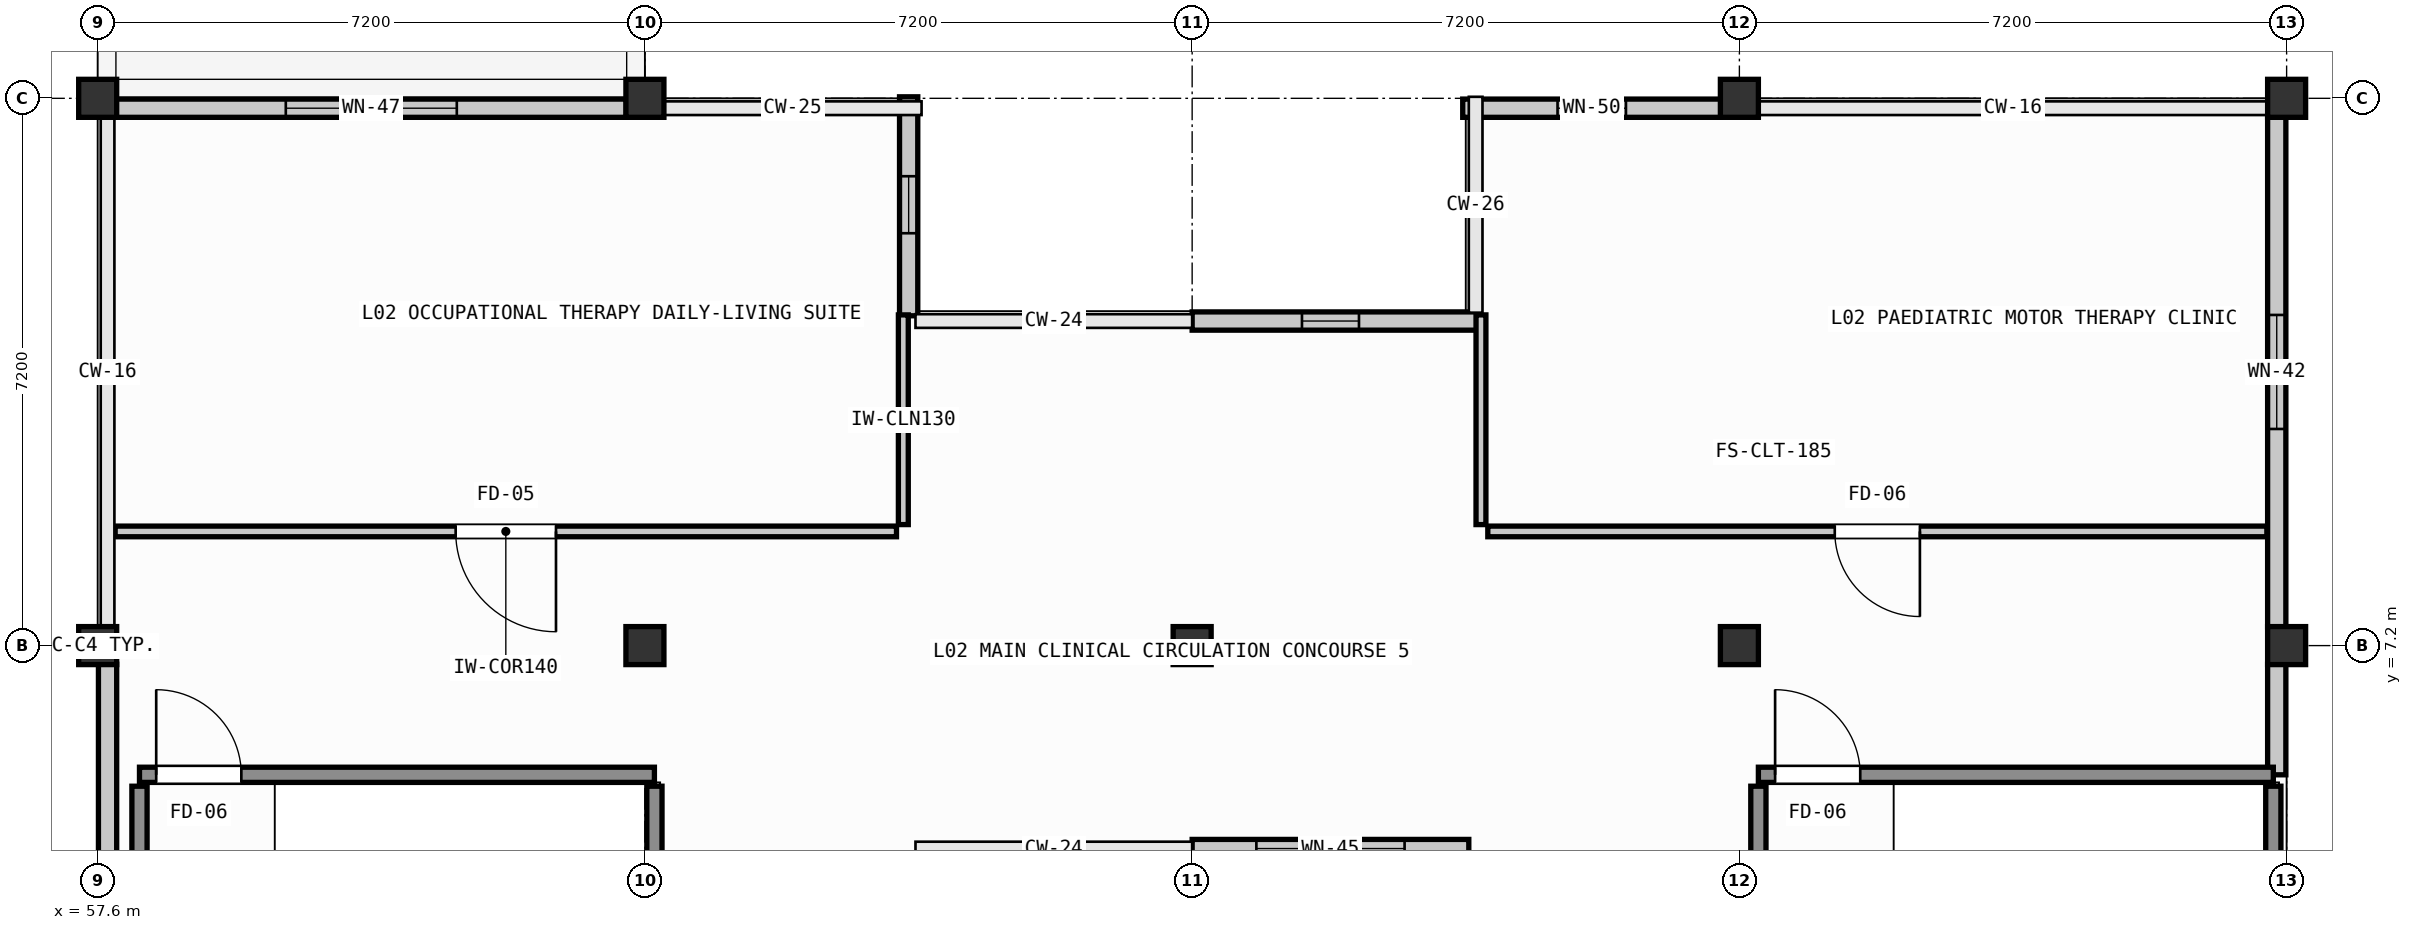
"""IFC4 building model, lengths in metres.
Left out: names, types, materials, properties, quantities, classifications, styles, units other than length and angle.
Written with IfcOpenShell. Run it as: python <this file> out.ifc"""

import sys

from ifc_helpers import new_model, si_unit, direction, frame, frame_2d, origin, origin_2d, place, context, subcontext, project, spatial, rectangle, extrude, element, fill, save


model = new_model("IFC4")
c1 = context("Model", 3, precision=1e-05, world=origin(), true_north=direction((0.0, 1.0)))
c2 = subcontext(c1, "Body", "Model", "MODEL_VIEW")
j1 = project(units=[si_unit("LENGTHUNIT", "METRE"), si_unit("PLANEANGLEUNIT", "RADIAN")], contexts=[c1])
p1 = place(None, origin())
s1 = spatial("IfcSite", under=j1, at=p1, CompositionType="ELEMENT")
p2 = place(p1, origin())
s2 = spatial("IfcBuilding", under=s1, at=p2, CompositionType="ELEMENT")
p3 = place(p2, frame((0.0, 0.0, 4.8)))
s3 = spatial("IfcBuildingStorey", under=s2, at=p3, CompositionType="ELEMENT", Elevation=4.8)
for number, where, z_axis, x_axis in (
    (1, (57.6, 7.2, 0.0), (0.0, 0.0, 1.0), (1.0, 0.0, 0.0)),
    (2, (57.6, 14.4, 0.0), (0.0, 0.0, 1.0), (1.0, 0.0, 0.0)),
    (3, (64.8, 7.2, 0.0), (0.0, 0.0, 1.0), (1.0, 0.0, 0.0)),
    (4, (64.8, 14.4, 0.0), (0.0, 0.0, 1.0), (1.0, 0.0, 0.0)),
    (5, (72.0, 7.2, 0.0), (0.0, 0.0, 1.0), (1.0, 0.0, 0.0)),
    (6, (79.2, 7.2, 0.0), (0.0, 0.0, 1.0), (1.0, 0.0, 0.0)),
    (7, (79.2, 14.4, 0.0), (0.0, 0.0, 1.0), (1.0, 0.0, 0.0)),
    (8, (86.4, 7.2, 0.0), (0.0, 0.0, 1.0), (1.0, 0.0, 0.0)),
    (9, (86.4, 14.4, 0.0), (0.0, 0.0, 1.0), (1.0, 0.0, 0.0)),
):
    element("IfcColumn", number, at=place(p3, frame(where, z_axis=z_axis, x_axis=x_axis)), inside=s3, PredefinedType="COLUMN", context=c2, shape_type="SweptSolid", body=[
        extrude(rectangle(XDim=0.5, YDim=0.5, at=origin_2d()), origin(), (0.0, 0.0, 1.0), 4.25),
    ])
p4 = place(p3, frame((86.27, 14.155, 0.0), z_axis=(0.0, 0.0, 1.0), x_axis=(0.0, -1.0, 0.0)))
e10 = element("IfcWall", 10, at=p4, inside=s3, PredefinedType="SOLIDWALL", context=c2, shape_type="SweptSolid", body=[
    extrude(rectangle(XDim=6.71, YDim=0.24, at=frame_2d((3.355, 0.0))), origin(), (0.0, 0.0, 1.0), 3.45),
])
p5 = place(p4, frame((2.605, 0.0, 0.95)))
e11 = element("IfcOpeningElement", 11, at=p5, cuts=e10, PredefinedType="OPENING", context=c2, shape_type="SweptSolid", body=[
    extrude(rectangle(XDim=1.5, YDim=1.55, at=frame_2d((0.75, 0.775))), frame((0.0, 0.13, 0.0), z_axis=(0.0, -1.0, 0.0), x_axis=(1.0, 0.0, 0.0)), (0.0, 0.0, 1.0), 0.26),
])
p6 = place(p3, frame((86.27, 6.955, 0.0), z_axis=(0.0, 0.0, 1.0), x_axis=(0.0, -1.0, 0.0)))
e12 = element("IfcWall", 12, at=p6, inside=s3, PredefinedType="SOLIDWALL", context=c2, shape_type="SweptSolid", body=[
    extrude(rectangle(XDim=1.455, YDim=0.24, at=frame_2d((0.728, 0.0))), origin(), (0.0, 0.0, 1.0), 3.45),
])
p7 = place(p3, frame((75.64, 4.53, 0.0), z_axis=(0.0, 0.0, 1.0), x_axis=(-1.0, 0.0, 0.0)))
e13 = element("IfcWall", 13, at=p7, inside=s3, PredefinedType="SOLIDWALL", context=c2, shape_type="SweptSolid", body=[
    extrude(rectangle(XDim=3.64, YDim=0.24, at=frame_2d((1.82, 0.0))), origin(), (0.0, 0.0, 1.0), 4.2),
])
p8 = place(p7, frame((0.845, 0.0, 0.95)))
e14 = element("IfcOpeningElement", 14, at=p8, cuts=e13, PredefinedType="OPENING", context=c2, shape_type="SweptSolid", body=[
    extrude(rectangle(XDim=1.95, YDim=1.55, at=frame_2d((0.975, 0.775))), frame((0.0, 0.13, 0.0), z_axis=(0.0, -1.0, 0.0), x_axis=(1.0, 0.0, 0.0)), (0.0, 0.0, 1.0), 0.26),
])
p9 = place(p3, frame((57.73, 2.38, 0.0), z_axis=(0.0, 0.0, 1.0), x_axis=(0.0, 1.0, 0.0)))
e15 = element("IfcWall", 15, at=p9, inside=s3, PredefinedType="SOLIDWALL", context=c2, shape_type="SweptSolid", body=[
    extrude(rectangle(XDim=4.575, YDim=0.24, at=frame_2d((2.288, 0.0))), origin(), (0.0, 0.0, 1.0), 3.45),
])
p10 = place(p3, frame((57.845, 14.27, 0.0), z_axis=(0.0, 0.0, 1.0), x_axis=(1.0, 0.0, 0.0)))
e16 = element("IfcWall", 16, at=p10, inside=s3, PredefinedType="SOLIDWALL", context=c2, shape_type="SweptSolid", body=[
    extrude(rectangle(XDim=6.71, YDim=0.24, at=frame_2d((3.355, 0.0))), origin(), (0.0, 0.0, 1.0), 3.45),
])
p11 = place(p10, frame((2.23, 0.0, 0.95)))
e17 = element("IfcOpeningElement", 17, at=p11, cuts=e16, PredefinedType="OPENING", context=c2, shape_type="SweptSolid", body=[
    extrude(rectangle(XDim=2.25, YDim=1.55, at=frame_2d((1.125, 0.775))), frame((0.0, 0.13, 0.0), z_axis=(0.0, -1.0, 0.0), x_axis=(1.0, 0.0, 0.0)), (0.0, 0.0, 1.0), 0.26),
])
p12 = place(p3, frame((68.27, 14.42, 0.0), z_axis=(0.0, 0.0, 1.0), x_axis=(0.0, -1.0, 0.0)))
e18 = element("IfcWall", 18, at=p12, inside=s3, PredefinedType="SOLIDWALL", context=c2, shape_type="SweptSolid", body=[
    extrude(rectangle(XDim=2.881, YDim=0.24, at=frame_2d((1.44, 0.0))), origin(), (0.0, 0.0, 1.0), 4.2),
])
p13 = place(p12, frame((1.045, 0.0, 0.95)))
e19 = element("IfcOpeningElement", 19, at=p13, cuts=e18, PredefinedType="OPENING", context=c2, shape_type="SweptSolid", body=[
    extrude(rectangle(XDim=0.75, YDim=1.85, at=frame_2d((0.375, 0.925))), frame((0.0, 0.13, 0.0), z_axis=(0.0, -1.0, 0.0), x_axis=(1.0, 0.0, 0.0)), (0.0, 0.0, 1.0), 0.26),
])
p14 = place(p3, frame((72.0, 11.47, 0.0), z_axis=(0.0, 0.0, 1.0), x_axis=(1.0, 0.0, 0.0)))
e20 = element("IfcWall", 20, at=p14, inside=s3, PredefinedType="SOLIDWALL", context=c2, shape_type="SweptSolid", body=[
    extrude(rectangle(XDim=3.751, YDim=0.24, at=frame_2d((1.875, 0.0))), origin(), (0.0, 0.0, 1.0), 4.2),
])
p15 = place(p14, frame((1.445, 0.0, 0.95)))
e21 = element("IfcOpeningElement", 21, at=p15, cuts=e20, PredefinedType="OPENING", context=c2, shape_type="SweptSolid", body=[
    extrude(rectangle(XDim=0.75, YDim=1.85, at=frame_2d((0.375, 0.925))), frame((0.0, 0.13, 0.0), z_axis=(0.0, -1.0, 0.0), x_axis=(1.0, 0.0, 0.0)), (0.0, 0.0, 1.0), 0.26),
])
p16 = place(p3, frame((75.56, 14.27, 0.0), z_axis=(0.0, 0.0, 1.0), x_axis=(1.0, 0.0, 0.0)))
e22 = element("IfcWall", 22, at=p16, inside=s3, PredefinedType="SOLIDWALL", context=c2, shape_type="SweptSolid", body=[
    extrude(rectangle(XDim=3.395, YDim=0.24, at=frame_2d((1.698, 0.0))), origin(), (0.0, 0.0, 1.0), 3.55),
])
p17 = place(p16, frame((1.248, 0.0, 0.95)))
e23 = element("IfcOpeningElement", 23, at=p17, cuts=e22, PredefinedType="OPENING", context=c2, shape_type="SweptSolid", body=[
    extrude(rectangle(XDim=0.9, YDim=1.85, at=frame_2d((0.45, 0.925))), frame((0.0, 0.13, 0.0), z_axis=(0.0, -1.0, 0.0), x_axis=(1.0, 0.0, 0.0)), (0.0, 0.0, 1.0), 0.26),
])
p18 = place(p3, frame((58.15, 5.5, 0.0), z_axis=(0.0, 0.0, 1.0), x_axis=(1.0, 0.0, 0.0)))
e24 = element("IfcWall", 24, at=p18, inside=s3, PredefinedType="SHEAR", context=c2, shape_type="SweptSolid", body=[
    extrude(rectangle(XDim=6.775, YDim=0.2, at=frame_2d((3.388, 0.0))), origin(), (0.0, 0.0, 1.0), 4.275),
])
p19 = place(p18, frame((0.22, 0.0, 0.0)))
e25 = element("IfcOpeningElement", 25, at=p19, cuts=e24, PredefinedType="OPENING", context=c2, shape_type="SweptSolid", body=[
    extrude(rectangle(XDim=1.12, YDim=2.14, at=frame_2d((0.56, 1.07))), frame((0.0, 0.11, 0.0), z_axis=(0.0, -1.0, 0.0), x_axis=(1.0, 0.0, 0.0)), (0.0, 0.0, 1.0), 0.22),
])
for number, where, z_axis, x_axis in (
    (26, (58.15, 2.75, 0.0), (0.0, 0.0, 1.0), (0.0, 1.0, 0.0)),
    (27, (64.925, 2.75, 0.0), (0.0, 0.0, 1.0), (0.0, 1.0, 0.0)),
):
    element("IfcWall", number, at=place(p3, frame(where, z_axis=z_axis, x_axis=x_axis)), inside=s3, PredefinedType="SHEAR", context=c2, shape_type="SweptSolid", body=[
        extrude(rectangle(XDim=2.6, YDim=0.2, at=frame_2d((1.3, 0.0))), origin(), (0.0, 0.0, 1.0), 4.275),
    ])
p20 = place(p3, frame((79.45, 5.5, 0.0), z_axis=(0.0, 0.0, 1.0), x_axis=(1.0, 0.0, 0.0)))
e28 = element("IfcWall", 28, at=p20, inside=s3, PredefinedType="SHEAR", context=c2, shape_type="SweptSolid", body=[
    extrude(rectangle(XDim=6.775, YDim=0.2, at=frame_2d((3.388, 0.0))), origin(), (0.0, 0.0, 1.0), 4.275),
])
p21 = place(p20, frame((0.22, 0.0, 0.0)))
e29 = element("IfcOpeningElement", 29, at=p21, cuts=e28, PredefinedType="OPENING", context=c2, shape_type="SweptSolid", body=[
    extrude(rectangle(XDim=1.12, YDim=2.14, at=frame_2d((0.56, 1.07))), frame((0.0, 0.11, 0.0), z_axis=(0.0, -1.0, 0.0), x_axis=(1.0, 0.0, 0.0)), (0.0, 0.0, 1.0), 0.22),
])
for number, where, z_axis, x_axis in (
    (30, (79.45, 2.75, 0.0), (0.0, 0.0, 1.0), (0.0, 1.0, 0.0)),
    (31, (86.225, 2.75, 0.0), (0.0, 0.0, 1.0), (0.0, 1.0, 0.0)),
):
    element("IfcWall", number, at=place(p3, frame(where, z_axis=z_axis, x_axis=x_axis)), inside=s3, PredefinedType="SHEAR", context=c2, shape_type="SweptSolid", body=[
        extrude(rectangle(XDim=2.6, YDim=0.2, at=frame_2d((1.3, 0.0))), origin(), (0.0, 0.0, 1.0), 4.275),
    ])
p22 = place(p3, frame((68.2, 11.551, 0.0), z_axis=(0.0, 0.0, 1.0), x_axis=(0.0, -1.0, 0.0)))
e32 = element("IfcWall", 32, at=p22, inside=s3, PredefinedType="PARTITIONING", context=c2, shape_type="SweptSolid", body=[
    extrude(rectangle(XDim=2.759, YDim=0.13, at=frame_2d((1.379, 0.0))), origin(), (0.0, 0.0, 1.0), 4.2),
])
p23 = place(p3, frame((68.11, 8.702, 0.0), z_axis=(0.0, 0.0, 1.0), x_axis=(-1.0, 0.0, 0.0)))
e33 = element("IfcWall", 33, at=p23, inside=s3, PredefinedType="PARTITIONING", context=c2, shape_type="SweptSolid", body=[
    extrude(rectangle(XDim=10.28, YDim=0.14, at=frame_2d((5.14, 0.0))), origin(), (0.0, 0.0, 1.0), 3.55),
])
p24 = place(p23, frame((4.48, 0.0, 0.0)))
e34 = element("IfcOpeningElement", 34, at=p24, cuts=e33, PredefinedType="OPENING", context=c2, shape_type="SweptSolid", body=[
    extrude(rectangle(XDim=1.32, YDim=2.2, at=frame_2d((0.66, 1.1))), frame((0.0, 0.08, 0.0), z_axis=(0.0, -1.0, 0.0), x_axis=(1.0, 0.0, 0.0)), (0.0, 0.0, 1.0), 0.16),
])
p25 = place(p3, frame((86.14, 8.702, 0.0), z_axis=(0.0, 0.0, 1.0), x_axis=(-1.0, 0.0, 0.0)))
e35 = element("IfcWall", 35, at=p25, inside=s3, PredefinedType="PARTITIONING", context=c2, shape_type="SweptSolid", body=[
    extrude(rectangle(XDim=10.25, YDim=0.14, at=frame_2d((5.125, 0.0))), origin(), (0.0, 0.0, 1.0), 3.55),
])
p26 = place(p25, frame((4.565, 0.0, 0.0)))
e36 = element("IfcOpeningElement", 36, at=p26, cuts=e35, PredefinedType="OPENING", context=c2, shape_type="SweptSolid", body=[
    extrude(rectangle(XDim=1.12, YDim=2.14, at=frame_2d((0.56, 1.07))), frame((0.0, 0.08, 0.0), z_axis=(0.0, -1.0, 0.0), x_axis=(1.0, 0.0, 0.0)), (0.0, 0.0, 1.0), 0.16),
])
p27 = place(p3, frame((75.8, 8.792, 0.0), z_axis=(0.0, 0.0, 1.0), x_axis=(0.0, 1.0, 0.0)))
e37 = element("IfcWall", 37, at=p27, inside=s3, PredefinedType="PARTITIONING", context=c2, shape_type="SweptSolid", body=[
    extrude(rectangle(XDim=2.759, YDim=0.13, at=frame_2d((1.379, 0.0))), origin(), (0.0, 0.0, 1.0), 4.2),
])
p28 = place(p5, origin())
e38 = element("IfcWindow", 38, at=p28, inside=s3, PartitioningType="SINGLE_PANEL", PredefinedType="WINDOW", context=c2, shape_type="SweptSolid", body=[
    extrude(rectangle(XDim=1.5, YDim=1.55, at=frame_2d((0.75, 0.775))), frame((0.0, 0.03, 0.0), z_axis=(0.0, -1.0, 0.0), x_axis=(1.0, 0.0, 0.0)), (0.0, 0.0, 1.0), 0.06),
])
fill(e11, e38)
p29 = place(p8, origin())
e39 = element("IfcWindow", 39, at=p29, inside=s3, PartitioningType="SINGLE_PANEL", PredefinedType="WINDOW", context=c2, shape_type="SweptSolid", body=[
    extrude(rectangle(XDim=1.95, YDim=1.55, at=frame_2d((0.975, 0.775))), frame((0.0, 0.03, 0.0), z_axis=(0.0, -1.0, 0.0), x_axis=(1.0, 0.0, 0.0)), (0.0, 0.0, 1.0), 0.06),
])
fill(e14, e39)
p30 = place(p11, origin())
e40 = element("IfcWindow", 40, at=p30, inside=s3, PartitioningType="SINGLE_PANEL", PredefinedType="WINDOW", context=c2, shape_type="SweptSolid", body=[
    extrude(rectangle(XDim=2.25, YDim=1.55, at=frame_2d((1.125, 0.775))), frame((0.0, 0.03, 0.0), z_axis=(0.0, -1.0, 0.0), x_axis=(1.0, 0.0, 0.0)), (0.0, 0.0, 1.0), 0.06),
])
fill(e17, e40)
p31 = place(p13, origin())
e41 = element("IfcWindow", 41, at=p31, inside=s3, PartitioningType="SINGLE_PANEL", PredefinedType="WINDOW", context=c2, shape_type="SweptSolid", body=[
    extrude(rectangle(XDim=0.75, YDim=1.85, at=frame_2d((0.375, 0.925))), frame((0.0, 0.03, 0.0), z_axis=(0.0, -1.0, 0.0), x_axis=(1.0, 0.0, 0.0)), (0.0, 0.0, 1.0), 0.06),
])
fill(e19, e41)
p32 = place(p15, origin())
e42 = element("IfcWindow", 42, at=p32, inside=s3, PartitioningType="SINGLE_PANEL", PredefinedType="WINDOW", context=c2, shape_type="SweptSolid", body=[
    extrude(rectangle(XDim=0.75, YDim=1.85, at=frame_2d((0.375, 0.925))), frame((0.0, 0.03, 0.0), z_axis=(0.0, -1.0, 0.0), x_axis=(1.0, 0.0, 0.0)), (0.0, 0.0, 1.0), 0.06),
])
fill(e21, e42)
p33 = place(p17, origin())
e43 = element("IfcWindow", 43, at=p33, inside=s3, PartitioningType="SINGLE_PANEL", PredefinedType="WINDOW", context=c2, shape_type="SweptSolid", body=[
    extrude(rectangle(XDim=0.9, YDim=1.85, at=frame_2d((0.45, 0.925))), frame((0.0, 0.03, 0.0), z_axis=(0.0, -1.0, 0.0), x_axis=(1.0, 0.0, 0.0)), (0.0, 0.0, 1.0), 0.06),
])
fill(e23, e43)
p34 = place(p19, origin())
e44 = element("IfcDoor", 44, at=p34, inside=s3, OperationType="SINGLE_SWING_RIGHT", PredefinedType="DOOR", context=c2, shape_type="SweptSolid", body=[
    extrude(rectangle(XDim=1.12, YDim=2.14, at=frame_2d((0.56, 1.07))), frame((0.0, 0.025, 0.0), z_axis=(0.0, -1.0, 0.0), x_axis=(1.0, 0.0, 0.0)), (0.0, 0.0, 1.0), 0.05),
])
fill(e25, e44)
p35 = place(p21, origin())
e45 = element("IfcDoor", 45, at=p35, inside=s3, OperationType="SINGLE_SWING_RIGHT", PredefinedType="DOOR", context=c2, shape_type="SweptSolid", body=[
    extrude(rectangle(XDim=1.12, YDim=2.14, at=frame_2d((0.56, 1.07))), frame((0.0, 0.025, 0.0), z_axis=(0.0, -1.0, 0.0), x_axis=(1.0, 0.0, 0.0)), (0.0, 0.0, 1.0), 0.05),
])
fill(e29, e45)
p36 = place(p24, origin())
e46 = element("IfcDoor", 46, at=p36, inside=s3, OperationType="SINGLE_SWING_LEFT", PredefinedType="DOOR", context=c2, shape_type="SweptSolid", body=[
    extrude(rectangle(XDim=1.32, YDim=2.2, at=frame_2d((0.66, 1.1))), frame((0.0, 0.025, 0.0), z_axis=(0.0, -1.0, 0.0), x_axis=(1.0, 0.0, 0.0)), (0.0, 0.0, 1.0), 0.05),
])
fill(e34, e46)
p37 = place(p26, origin())
e47 = element("IfcDoor", 47, at=p37, inside=s3, OperationType="SINGLE_SWING_RIGHT", PredefinedType="DOOR", context=c2, shape_type="SweptSolid", body=[
    extrude(rectangle(XDim=1.12, YDim=2.14, at=frame_2d((0.56, 1.07))), frame((0.0, 0.025, 0.0), z_axis=(0.0, -1.0, 0.0), x_axis=(1.0, 0.0, 0.0)), (0.0, 0.0, 1.0), 0.05),
])
fill(e36, e47)
save(model, sys.argv[1])
